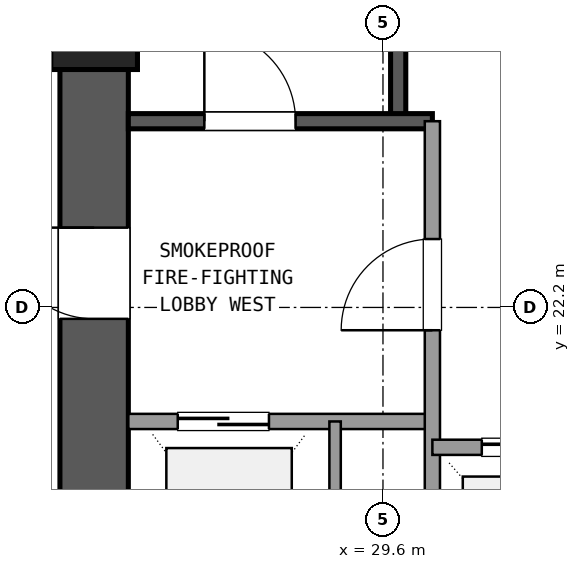
"""IFC4 building model, lengths in metres.
Left out: names, types, materials, properties, quantities, classifications, styles, units other than length and angle.
Written with IfcOpenShell. Run it as: python <this file> out.ifc"""

import sys

from ifc_helpers import new_model, si_unit, direction, frame, frame_2d, origin, origin_2d, place, context, subcontext, project, spatial, rectangle, extrude, element, fill, save


model = new_model("IFC4")
c1 = context("Model", 3, precision=1e-05, world=origin(), true_north=direction((0.0, 1.0)))
c2 = subcontext(c1, "Body", "Model", "MODEL_VIEW")
j1 = project(units=[si_unit("LENGTHUNIT", "METRE"), si_unit("PLANEANGLEUNIT", "RADIAN")], contexts=[c1])
p1 = place(None, origin())
s1 = spatial("IfcSite", under=j1, at=p1, CompositionType="ELEMENT")
p2 = place(p1, origin())
s2 = spatial("IfcBuilding", under=s1, at=p2, CompositionType="ELEMENT")
p3 = place(p2, frame((0.0, 0.0, -9.72)))
s3 = spatial("IfcBuildingStorey", under=s2, at=p3, CompositionType="ELEMENT", Elevation=-9.72)
p4 = place(p3, frame((25.8, 25.9, 0.0), z_axis=(0.0, 0.0, 1.0), x_axis=(1.0, 0.0, 0.0)))
e1 = element("IfcColumn", 1, at=p4, inside=s3, PredefinedType="COLUMN", context=c2, shape_type="SweptSolid", body=[
    extrude(rectangle(XDim=1.14, YDim=1.14, at=origin_2d()), origin(), (0.0, 0.0, 1.0), 4.86),
])
p5 = place(p3, frame((25.8, 25.335, 0.0), z_axis=(0.0, 0.0, 1.0), x_axis=(0.0, -1.0, 0.0)))
e2 = element("IfcWall", 2, at=p5, inside=s3, PredefinedType="SHEAR", context=c2, shape_type="SweptSolid", body=[
    extrude(rectangle(XDim=7.47, YDim=0.9, at=frame_2d((3.735, 0.0))), origin(), (0.0, 0.0, 1.0), 4.56),
])
p6 = place(p5, frame((2.085, 0.0, 0.0)))
e3 = element("IfcOpeningElement", 3, at=p6, cuts=e2, PredefinedType="OPENING", context=c2, shape_type="SweptSolid", body=[
    extrude(rectangle(XDim=1.2, YDim=2.15, at=frame_2d((0.6, 1.075))), frame((0.0, 0.46, 0.0), z_axis=(0.0, -1.0, 0.0), x_axis=(1.0, 0.0, 0.0)), (0.0, 0.0, 1.0), 0.92),
])
p7 = place(p3, frame((29.8, 24.65, 0.0), z_axis=(0.0, 0.0, 1.0), x_axis=(0.0, 1.0, 0.0)))
e4 = element("IfcWall", 4, at=p7, inside=s3, PredefinedType="SHEAR", context=c2, shape_type="SweptSolid", body=[
    extrude(rectangle(XDim=9.4, YDim=0.2, at=frame_2d((4.7, 0.0))), origin(), (0.0, 0.0, 1.0), 4.56),
])
p8 = place(p3, frame((26.25, 24.65, 0.0), z_axis=(0.0, 0.0, 1.0), x_axis=(1.0, 0.0, 0.0)))
e5 = element("IfcWall", 5, at=p8, inside=s3, PredefinedType="SHEAR", context=c2, shape_type="SweptSolid", body=[
    extrude(rectangle(XDim=4.0, YDim=0.2, at=frame_2d((2.0, 0.0))), origin(), (0.0, 0.0, 1.0), 4.56),
])
p9 = place(p8, frame((1.0, 0.0, 0.0)))
e6 = element("IfcOpeningElement", 6, at=p9, cuts=e5, PredefinedType="OPENING", context=c2, shape_type="SweptSolid", body=[
    extrude(rectangle(XDim=1.2, YDim=2.15, at=frame_2d((0.6, 1.075))), frame((0.0, 0.11, 0.0), z_axis=(0.0, -1.0, 0.0), x_axis=(1.0, 0.0, 0.0)), (0.0, 0.0, 1.0), 0.22),
])
p10 = place(p3, frame((26.25, 20.7, 0.0), z_axis=(0.0, 0.0, 1.0), x_axis=(1.0, 0.0, 0.0)))
e7 = element("IfcWall", 7, at=p10, inside=s3, PredefinedType="SOLIDWALL", context=c2, shape_type="SweptSolid", body=[
    extrude(rectangle(XDim=4.0, YDim=0.2, at=frame_2d((2.0, 0.0))), origin(), (0.0, 0.0, 1.0), 3.85),
])
p11 = place(p10, frame((0.65, 0.0, 0.0)))
e8 = element("IfcOpeningElement", 8, at=p11, cuts=e7, PredefinedType="OPENING", context=c2, shape_type="SweptSolid", body=[
    extrude(rectangle(XDim=1.2, YDim=2.15, at=frame_2d((0.6, 1.075))), frame((0.0, 0.11, 0.0), z_axis=(0.0, -1.0, 0.0), x_axis=(1.0, 0.0, 0.0)), (0.0, 0.0, 1.0), 0.22),
])
p12 = place(p3, frame((30.25, 17.75, 0.0), z_axis=(0.0, 0.0, 1.0), x_axis=(0.0, 1.0, 0.0)))
e9 = element("IfcWall", 9, at=p12, inside=s3, PredefinedType="SOLIDWALL", context=c2, shape_type="SweptSolid", body=[
    extrude(rectangle(XDim=6.9, YDim=0.2, at=frame_2d((3.45, 0.0))), origin(), (0.0, 0.0, 1.0), 3.85),
])
p13 = place(p12, frame((4.15, 0.0, 0.0)))
e10 = element("IfcOpeningElement", 10, at=p13, cuts=e9, PredefinedType="OPENING", context=c2, shape_type="SweptSolid", body=[
    extrude(rectangle(XDim=1.2, YDim=2.15, at=frame_2d((0.6, 1.075))), frame((0.0, 0.11, 0.0), z_axis=(0.0, -1.0, 0.0), x_axis=(1.0, 0.0, 0.0)), (0.0, 0.0, 1.0), 0.22),
])
p14 = place(p3, frame((28.97, 17.75, 0.0), z_axis=(0.0, 0.0, 1.0), x_axis=(0.0, 1.0, 0.0)))
e11 = element("IfcWall", 11, at=p14, inside=s3, PredefinedType="PARTITIONING", context=c2, shape_type="SweptSolid", body=[
    extrude(rectangle(XDim=2.95, YDim=0.15, at=frame_2d((1.475, 0.0))), origin(), (0.0, 0.0, 1.0), 3.85),
])
p15 = place(p3, frame((30.25, 20.36, 0.0), z_axis=(0.0, 0.0, 1.0), x_axis=(1.0, 0.0, 0.0)))
e12 = element("IfcWall", 12, at=p15, inside=s3, PredefinedType="SOLIDWALL", context=c2, shape_type="SweptSolid", body=[
    extrude(rectangle(XDim=7.0, YDim=0.2, at=frame_2d((3.5, 0.0))), origin(), (0.0, 0.0, 1.0), 3.85),
])
p16 = place(p15, frame((0.65, 0.0, 0.0)))
e13 = element("IfcOpeningElement", 13, at=p16, cuts=e12, PredefinedType="OPENING", context=c2, shape_type="SweptSolid", body=[
    extrude(rectangle(XDim=1.1, YDim=2.15, at=frame_2d((0.55, 1.075))), frame((0.0, 0.11, 0.0), z_axis=(0.0, -1.0, 0.0), x_axis=(1.0, 0.0, 0.0)), (0.0, 0.0, 1.0), 0.22),
])
p17 = place(p15, frame((2.95, 0.0, 0.0)))
e14 = element("IfcOpeningElement", 14, at=p17, cuts=e12, PredefinedType="OPENING", context=c2, shape_type="SweptSolid", body=[
    extrude(rectangle(XDim=1.1, YDim=2.15, at=frame_2d((0.55, 1.075))), frame((0.0, 0.11, 0.0), z_axis=(0.0, -1.0, 0.0), x_axis=(1.0, 0.0, 0.0)), (0.0, 0.0, 1.0), 0.22),
])
p18 = place(p15, frame((5.25, 0.0, 0.0)))
e15 = element("IfcOpeningElement", 15, at=p18, cuts=e12, PredefinedType="OPENING", context=c2, shape_type="SweptSolid", body=[
    extrude(rectangle(XDim=1.1, YDim=2.15, at=frame_2d((0.55, 1.075))), frame((0.0, 0.11, 0.0), z_axis=(0.0, -1.0, 0.0), x_axis=(1.0, 0.0, 0.0)), (0.0, 0.0, 1.0), 0.22),
])
p19 = place(p9, origin())
e16 = element("IfcDoor", 16, at=p19, inside=s3, OperationType="SINGLE_SWING_LEFT", PredefinedType="DOOR", context=c2, shape_type="SweptSolid", body=[
    extrude(rectangle(XDim=1.2, YDim=2.15, at=frame_2d((0.6, 1.075))), frame((0.0, 0.025, 0.0), z_axis=(0.0, -1.0, 0.0), x_axis=(1.0, 0.0, 0.0)), (0.0, 0.0, 1.0), 0.05),
])
fill(e6, e16)
p20 = place(p11, origin())
e17 = element("IfcDoor", 17, at=p20, inside=s3, OperationType="SLIDING_TO_LEFT", PredefinedType="DOOR", context=c2, shape_type="SweptSolid", body=[
    extrude(rectangle(XDim=1.2, YDim=2.15, at=frame_2d((0.6, 1.075))), frame((0.0, 0.025, 0.0), z_axis=(0.0, -1.0, 0.0), x_axis=(1.0, 0.0, 0.0)), (0.0, 0.0, 1.0), 0.05),
])
fill(e8, e17)
p21 = place(p13, origin())
e18 = element("IfcDoor", 18, at=p21, inside=s3, OperationType="SINGLE_SWING_LEFT", PredefinedType="DOOR", context=c2, shape_type="SweptSolid", body=[
    extrude(rectangle(XDim=1.2, YDim=2.15, at=frame_2d((0.6, 1.075))), frame((0.0, 0.025, 0.0), z_axis=(0.0, -1.0, 0.0), x_axis=(1.0, 0.0, 0.0)), (0.0, 0.0, 1.0), 0.05),
])
fill(e10, e18)
p22 = place(p6, frame((1.2, 0.0, 0.0), z_axis=(0.0, 0.0, 1.0), x_axis=(-1.0, 0.0, 0.0)))
e19 = element("IfcDoor", 19, at=p22, inside=s3, OperationType="SINGLE_SWING_LEFT", PredefinedType="DOOR", context=c2, shape_type="SweptSolid", body=[
    extrude(rectangle(XDim=1.2, YDim=2.15, at=frame_2d((0.6, 1.075))), frame((0.0, 0.025, 0.0), z_axis=(0.0, -1.0, 0.0), x_axis=(1.0, 0.0, 0.0)), (0.0, 0.0, 1.0), 0.05),
])
fill(e3, e19)
p23 = place(p16, origin())
e20 = element("IfcDoor", 20, at=p23, inside=s3, OperationType="SLIDING_TO_LEFT", PredefinedType="DOOR", context=c2, shape_type="SweptSolid", body=[
    extrude(rectangle(XDim=1.1, YDim=2.15, at=frame_2d((0.55, 1.075))), frame((0.0, 0.025, 0.0), z_axis=(0.0, -1.0, 0.0), x_axis=(1.0, 0.0, 0.0)), (0.0, 0.0, 1.0), 0.05),
])
fill(e13, e20)
save(model, sys.argv[1])
